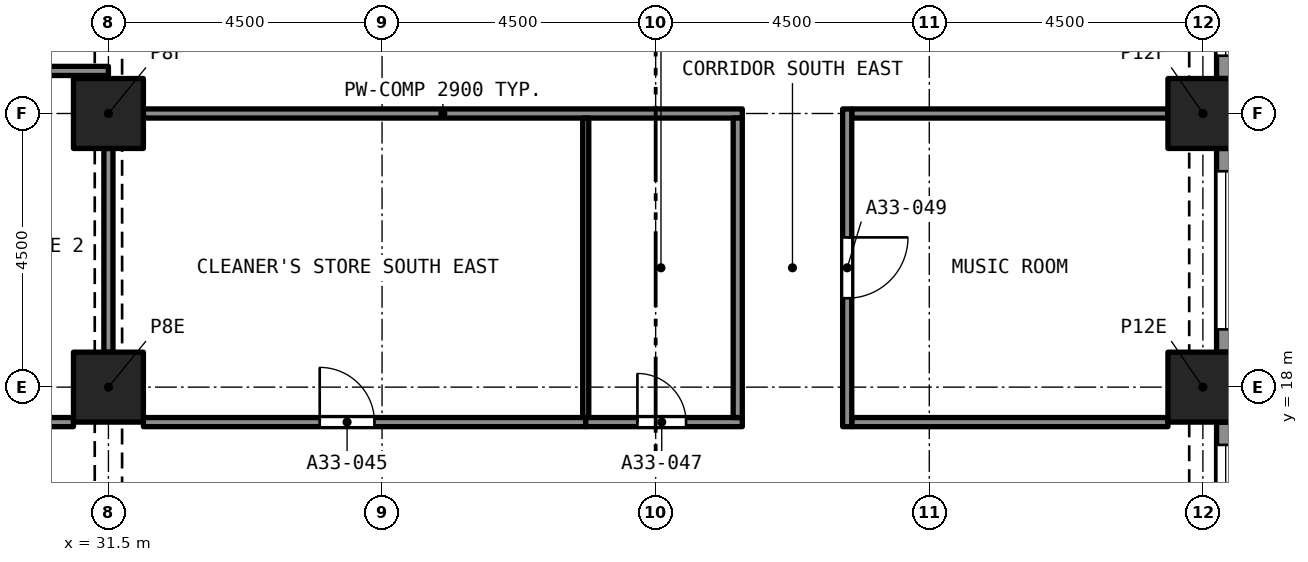
"""IFC4 building model, lengths in metres.
Left out: names, types, materials, properties, quantities, classifications, styles, units other than length and angle.
Written with IfcOpenShell. Run it as: python <this file> out.ifc"""

import sys

from ifc_helpers import new_model, si_unit, direction, frame, frame_2d, origin, origin_2d, place, context, subcontext, project, spatial, rectangle, extrude, element, fill, save


model = new_model("IFC4")
c1 = context("Model", 3, precision=1e-05, world=origin(), true_north=direction((0.0, 1.0)))
c2 = subcontext(c1, "Body", "Model", "MODEL_VIEW")
j1 = project(units=[si_unit("LENGTHUNIT", "METRE"), si_unit("PLANEANGLEUNIT", "RADIAN")], contexts=[c1])
p1 = place(None, origin())
s1 = spatial("IfcSite", under=j1, at=p1, CompositionType="ELEMENT")
p2 = place(p1, origin())
s2 = spatial("IfcBuilding", under=s1, at=p2, CompositionType="ELEMENT")
p3 = place(p2, frame((0.0, 0.0, 118.4)))
s3 = spatial("IfcBuildingStorey", under=s2, at=p3, CompositionType="ELEMENT", Elevation=118.4)
for number, where, z_axis, x_axis in (
    (1, (31.5, 18.0, 0.0), (0.0, 0.0, 1.0), (1.0, 0.0, 0.0)),
    (2, (49.5, 18.0, 0.0), (0.0, 0.0, 1.0), (1.0, 0.0, 0.0)),
    (3, (31.5, 22.5, 0.0), (0.0, 0.0, 1.0), (1.0, 0.0, 0.0)),
    (4, (49.5, 22.5, 0.0), (0.0, 0.0, 1.0), (1.0, 0.0, 0.0)),
):
    element("IfcColumn", number, at=place(p3, frame(where, z_axis=z_axis, x_axis=x_axis)), inside=s3, PredefinedType="COLUMN", context=c2, shape_type="SweptSolid", body=[
        extrude(rectangle(XDim=1.15, YDim=1.15, at=origin_2d()), origin(), (0.0, 0.0, 1.0), 3.2),
    ])
p4 = place(p3, frame((49.875, 17.425, 0.0), z_axis=(0.0, 0.0, 1.0), x_axis=(0.0, -1.0, 0.0)))
e5 = element("IfcWall", 5, at=p4, inside=s3, PredefinedType="SOLIDWALL", context=c2, shape_type="SweptSolid", body=[
    extrude(rectangle(XDim=3.35, YDim=0.3, at=frame_2d((1.675, 0.0))), origin(), (0.0, 0.0, 1.0), 3.2),
])
p5 = place(p4, frame((0.375, 0.0, 0.45)))
e6 = element("IfcOpeningElement", 6, at=p5, cuts=e5, PredefinedType="OPENING", context=c2, shape_type="SweptSolid", body=[
    extrude(rectangle(XDim=2.6, YDim=1.95, at=frame_2d((1.3, 0.975))), frame((0.0, 0.16, 0.0), z_axis=(0.0, -1.0, 0.0), x_axis=(1.0, 0.0, 0.0)), (0.0, 0.0, 1.0), 0.32),
])
p6 = place(p3, frame((49.875, 21.925, 0.0), z_axis=(0.0, 0.0, 1.0), x_axis=(0.0, -1.0, 0.0)))
e7 = element("IfcWall", 7, at=p6, inside=s3, PredefinedType="SOLIDWALL", context=c2, shape_type="SweptSolid", body=[
    extrude(rectangle(XDim=3.35, YDim=0.3, at=frame_2d((1.675, 0.0))), origin(), (0.0, 0.0, 1.0), 3.2),
])
p7 = place(p6, frame((0.375, 0.0, 0.45)))
e8 = element("IfcOpeningElement", 8, at=p7, cuts=e7, PredefinedType="OPENING", context=c2, shape_type="SweptSolid", body=[
    extrude(rectangle(XDim=2.6, YDim=1.95, at=frame_2d((1.3, 0.975))), frame((0.0, 0.16, 0.0), z_axis=(0.0, -1.0, 0.0), x_axis=(1.0, 0.0, 0.0)), (0.0, 0.0, 1.0), 0.32),
])
p8 = place(p3, frame((49.875, 26.425, 0.0), z_axis=(0.0, 0.0, 1.0), x_axis=(0.0, -1.0, 0.0)))
e9 = element("IfcWall", 9, at=p8, inside=s3, PredefinedType="SOLIDWALL", context=c2, shape_type="SweptSolid", body=[
    extrude(rectangle(XDim=3.35, YDim=0.3, at=frame_2d((1.675, 0.0))), origin(), (0.0, 0.0, 1.0), 3.2),
])
p9 = place(p8, frame((0.375, 0.0, 0.45)))
e10 = element("IfcOpeningElement", 10, at=p9, cuts=e9, PredefinedType="OPENING", context=c2, shape_type="SweptSolid", body=[
    extrude(rectangle(XDim=2.6, YDim=1.95, at=frame_2d((1.3, 0.975))), frame((0.0, 0.16, 0.0), z_axis=(0.0, -1.0, 0.0), x_axis=(1.0, 0.0, 0.0)), (0.0, 0.0, 1.0), 0.32),
])
p10 = place(p3, frame((25.725, 17.425, 0.0), z_axis=(0.0, 0.0, 1.0), x_axis=(1.0, 0.0, 0.0)))
e11 = element("IfcWall", 11, at=p10, inside=s3, PredefinedType="PARTITIONING", context=c2, shape_type="SweptSolid", body=[
    extrude(rectangle(XDim=5.2, YDim=0.15, at=frame_2d((2.6, 0.0))), origin(), (0.0, 0.0, 1.0), 2.75),
])
p11 = place(p3, frame((32.075, 17.425, 0.0), z_axis=(0.0, 0.0, 1.0), x_axis=(1.0, 0.0, 0.0)))
e12 = element("IfcWall", 12, at=p11, inside=s3, PredefinedType="PARTITIONING", context=c2, shape_type="SweptSolid", body=[
    extrude(rectangle(XDim=7.275, YDim=0.15, at=frame_2d((3.638, 0.0))), origin(), (0.0, 0.0, 1.0), 2.9),
])
p12 = place(p11, frame((2.9, 0.0, 0.0)))
e13 = element("IfcOpeningElement", 13, at=p12, cuts=e12, PredefinedType="OPENING", context=c2, shape_type="SweptSolid", body=[
    extrude(rectangle(XDim=0.9, YDim=2.1, at=frame_2d((0.45, 1.05))), frame((0.0, 0.085, 0.0), z_axis=(0.0, -1.0, 0.0), x_axis=(1.0, 0.0, 0.0)), (0.0, 0.0, 1.0), 0.17),
])
p13 = place(p3, frame((39.35, 17.425, 0.0), z_axis=(0.0, 0.0, 1.0), x_axis=(1.0, 0.0, 0.0)))
e14 = element("IfcWall", 14, at=p13, inside=s3, PredefinedType="PARTITIONING", context=c2, shape_type="SweptSolid", body=[
    extrude(rectangle(XDim=2.575, YDim=0.15, at=frame_2d((1.288, 0.0))), origin(), (0.0, 0.0, 1.0), 2.9),
])
p14 = place(p13, frame((0.85, 0.0, 0.0)))
e15 = element("IfcOpeningElement", 15, at=p14, cuts=e14, PredefinedType="OPENING", context=c2, shape_type="SweptSolid", body=[
    extrude(rectangle(XDim=0.8, YDim=2.1, at=frame_2d((0.4, 1.05))), frame((0.0, 0.085, 0.0), z_axis=(0.0, -1.0, 0.0), x_axis=(1.0, 0.0, 0.0)), (0.0, 0.0, 1.0), 0.17),
])
p15 = place(p3, frame((43.725, 17.425, 0.0), z_axis=(0.0, 0.0, 1.0), x_axis=(1.0, 0.0, 0.0)))
e16 = element("IfcWall", 16, at=p15, inside=s3, PredefinedType="PARTITIONING", context=c2, shape_type="SweptSolid", body=[
    extrude(rectangle(XDim=5.2, YDim=0.15, at=frame_2d((2.6, 0.0))), origin(), (0.0, 0.0, 1.0), 2.9),
])
p16 = place(p3, frame((25.725, 23.2, 0.0), z_axis=(0.0, 0.0, 1.0), x_axis=(1.0, 0.0, 0.0)))
e17 = element("IfcWall", 17, at=p16, inside=s3, PredefinedType="PARTITIONING", context=c2, shape_type="SweptSolid", body=[
    extrude(rectangle(XDim=5.775, YDim=0.15, at=frame_2d((2.887, 0.0))), origin(), (0.0, 0.0, 1.0), 2.75),
])
p17 = place(p3, frame((31.5, 18.575, 0.0), z_axis=(0.0, 0.0, 1.0), x_axis=(0.0, 1.0, 0.0)))
e18 = element("IfcWall", 18, at=p17, inside=s3, PredefinedType="PARTITIONING", context=c2, shape_type="SweptSolid", body=[
    extrude(rectangle(XDim=3.35, YDim=0.15, at=frame_2d((1.675, 0.0))), origin(), (0.0, 0.0, 1.0), 2.38),
])
p18 = place(p3, frame((32.075, 22.5, 0.0), z_axis=(0.0, 0.0, 1.0), x_axis=(1.0, 0.0, 0.0)))
e19 = element("IfcWall", 19, at=p18, inside=s3, PredefinedType="PARTITIONING", context=c2, shape_type="SweptSolid", body=[
    extrude(rectangle(XDim=9.85, YDim=0.15, at=frame_2d((4.925, 0.0))), origin(), (0.0, 0.0, 1.0), 2.9),
])
p19 = place(p3, frame((43.725, 22.5, 0.0), z_axis=(0.0, 0.0, 1.0), x_axis=(1.0, 0.0, 0.0)))
e20 = element("IfcWall", 20, at=p19, inside=s3, PredefinedType="PARTITIONING", context=c2, shape_type="SweptSolid", body=[
    extrude(rectangle(XDim=5.2, YDim=0.15, at=frame_2d((2.6, 0.0))), origin(), (0.0, 0.0, 1.0), 2.9),
])
p20 = place(p3, frame((41.85, 17.5, 0.0), z_axis=(0.0, 0.0, 1.0), x_axis=(0.0, 1.0, 0.0)))
e21 = element("IfcWall", 21, at=p20, inside=s3, PredefinedType="PARTITIONING", context=c2, shape_type="SweptSolid", body=[
    extrude(rectangle(XDim=4.925, YDim=0.15, at=frame_2d((2.462, 0.0))), origin(), (0.0, 0.0, 1.0), 2.9),
])
p21 = place(p3, frame((43.65, 22.575, 0.0), z_axis=(0.0, 0.0, 1.0), x_axis=(0.0, -1.0, 0.0)))
e22 = element("IfcWall", 22, at=p21, inside=s3, PredefinedType="PARTITIONING", context=c2, shape_type="SweptSolid", body=[
    extrude(rectangle(XDim=5.225, YDim=0.15, at=frame_2d((2.612, 0.0))), origin(), (0.0, 0.0, 1.0), 2.9),
])
p22 = place(p21, frame((2.113, 0.0, 0.0)))
e23 = element("IfcOpeningElement", 23, at=p22, cuts=e22, PredefinedType="OPENING", context=c2, shape_type="SweptSolid", body=[
    extrude(rectangle(XDim=1.0, YDim=2.1, at=frame_2d((0.5, 1.05))), frame((0.0, 0.085, 0.0), z_axis=(0.0, -1.0, 0.0), x_axis=(1.0, 0.0, 0.0)), (0.0, 0.0, 1.0), 0.17),
])
p23 = place(p3, frame((39.35, 17.5, 0.0), z_axis=(0.0, 0.0, 1.0), x_axis=(0.0, 1.0, 0.0)))
e24 = element("IfcWall", 24, at=p23, inside=s3, PredefinedType="PARTITIONING", context=c2, shape_type="SweptSolid", body=[
    extrude(rectangle(XDim=4.925, YDim=0.1, at=frame_2d((2.462, 0.0))), origin(), (0.0, 0.0, 1.0), 2.9),
])
p24 = place(p5, origin())
e25 = element("IfcWindow", 25, at=p24, inside=s3, PartitioningType="SINGLE_PANEL", PredefinedType="WINDOW", context=c2, shape_type="SweptSolid", body=[
    extrude(rectangle(XDim=2.6, YDim=1.95, at=frame_2d((1.3, 0.975))), frame((0.0, 0.03, 0.0), z_axis=(0.0, -1.0, 0.0), x_axis=(1.0, 0.0, 0.0)), (0.0, 0.0, 1.0), 0.06),
])
fill(e6, e25)
p25 = place(p7, origin())
e26 = element("IfcWindow", 26, at=p25, inside=s3, PartitioningType="SINGLE_PANEL", PredefinedType="WINDOW", context=c2, shape_type="SweptSolid", body=[
    extrude(rectangle(XDim=2.6, YDim=1.95, at=frame_2d((1.3, 0.975))), frame((0.0, 0.03, 0.0), z_axis=(0.0, -1.0, 0.0), x_axis=(1.0, 0.0, 0.0)), (0.0, 0.0, 1.0), 0.06),
])
fill(e8, e26)
p26 = place(p9, origin())
e27 = element("IfcWindow", 27, at=p26, inside=s3, PartitioningType="SINGLE_PANEL", PredefinedType="WINDOW", context=c2, shape_type="SweptSolid", body=[
    extrude(rectangle(XDim=2.6, YDim=1.95, at=frame_2d((1.3, 0.975))), frame((0.0, 0.03, 0.0), z_axis=(0.0, -1.0, 0.0), x_axis=(1.0, 0.0, 0.0)), (0.0, 0.0, 1.0), 0.06),
])
fill(e10, e27)
p27 = place(p12, origin())
e28 = element("IfcDoor", 28, at=p27, inside=s3, OperationType="SINGLE_SWING_LEFT", PredefinedType="DOOR", context=c2, shape_type="SweptSolid", body=[
    extrude(rectangle(XDim=0.9, YDim=2.1, at=frame_2d((0.45, 1.05))), frame((0.0, 0.025, 0.0), z_axis=(0.0, -1.0, 0.0), x_axis=(1.0, 0.0, 0.0)), (0.0, 0.0, 1.0), 0.05),
])
fill(e13, e28)
p28 = place(p14, origin())
e29 = element("IfcDoor", 29, at=p28, inside=s3, OperationType="SINGLE_SWING_LEFT", PredefinedType="DOOR", context=c2, shape_type="SweptSolid", body=[
    extrude(rectangle(XDim=0.8, YDim=2.1, at=frame_2d((0.4, 1.05))), frame((0.0, 0.025, 0.0), z_axis=(0.0, -1.0, 0.0), x_axis=(1.0, 0.0, 0.0)), (0.0, 0.0, 1.0), 0.05),
])
fill(e15, e29)
p29 = place(p22, origin())
e30 = element("IfcDoor", 30, at=p29, inside=s3, OperationType="SINGLE_SWING_RIGHT", PredefinedType="DOOR", context=c2, shape_type="SweptSolid", body=[
    extrude(rectangle(XDim=1.0, YDim=2.1, at=frame_2d((0.5, 1.05))), frame((0.0, 0.025, 0.0), z_axis=(0.0, -1.0, 0.0), x_axis=(1.0, 0.0, 0.0)), (0.0, 0.0, 1.0), 0.05),
])
fill(e23, e30)
save(model, sys.argv[1])
